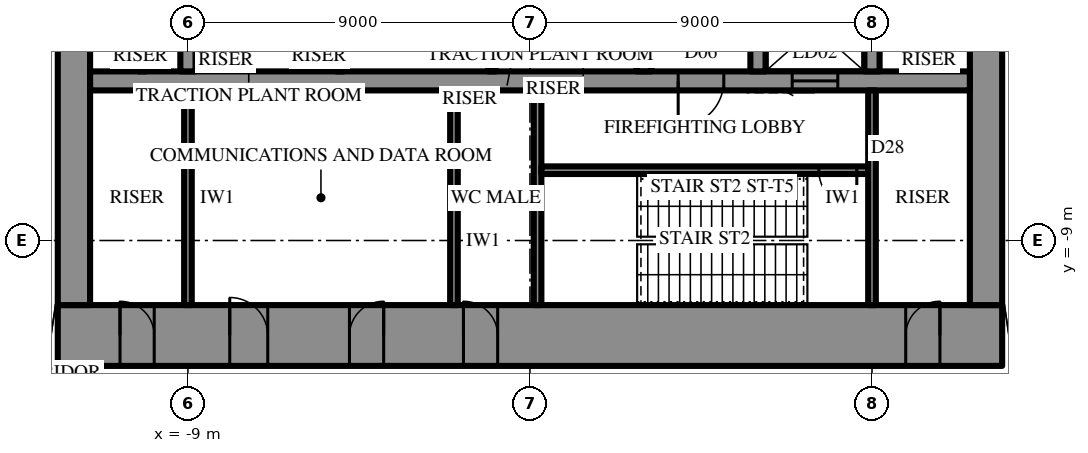
"""IFC4 building model, lengths in metres.
Left out: names, types, materials, properties, quantities, classifications, styles, units other than length and angle.
Written with IfcOpenShell. Run it as: python <this file> out.ifc"""

import sys

from ifc_helpers import new_model, si_unit, direction, frame, frame_2d, origin, place, context, subcontext, project, spatial, rectangle, extrude, element, fill, save


model = new_model("IFC4")
c1 = context("Model", 3, precision=1e-05, world=origin(), true_north=direction((0.0, 1.0)))
c2 = subcontext(c1, "Body", "Model", "MODEL_VIEW")
j1 = project(units=[si_unit("LENGTHUNIT", "METRE"), si_unit("PLANEANGLEUNIT", "RADIAN")], contexts=[c1])
p1 = place(None, origin())
s1 = spatial("IfcSite", under=j1, at=p1, CompositionType="ELEMENT")
p2 = place(p1, origin())
s2 = spatial("IfcBuilding", under=s1, at=p2, CompositionType="ELEMENT")
p3 = place(p2, frame((0.0, 0.0, 396.3)))
s3 = spatial("IfcBuildingStorey", under=s2, at=p3, CompositionType="ELEMENT", Elevation=396.3)
p4 = place(p3, frame((12.425, -11.5, 0.0), z_axis=(0.0, 0.0, 1.0), x_axis=(-1.0, 0.0, 0.0)))
e1 = element("IfcWall", 1, at=p4, inside=s3, PredefinedType="SHEAR", context=c2, shape_type="SweptSolid", body=[
    extrude(rectangle(XDim=24.85, YDim=1.6, at=frame_2d((12.425, 0.0))), origin(), (0.0, 0.0, 1.0), 6.0),
])
p5 = place(p4, frame((13.275, 0.0, 0.0)))
e2 = element("IfcOpeningElement", 2, at=p5, cuts=e1, PredefinedType="OPENING", context=c2, shape_type="SweptSolid", body=[
    extrude(rectangle(XDim=0.9, YDim=2.2, at=frame_2d((0.45, 1.1))), frame((0.0, 0.81, 0.0), z_axis=(0.0, -1.0, 0.0), x_axis=(1.0, 0.0, 0.0)), (0.0, 0.0, 1.0), 1.62),
])
p6 = place(p4, frame((16.275, 0.0, 0.0)))
e3 = element("IfcOpeningElement", 3, at=p6, cuts=e1, PredefinedType="OPENING", context=c2, shape_type="SweptSolid", body=[
    extrude(rectangle(XDim=0.9, YDim=2.2, at=frame_2d((0.45, 1.1))), frame((0.0, 0.81, 0.0), z_axis=(0.0, -1.0, 0.0), x_axis=(1.0, 0.0, 0.0)), (0.0, 0.0, 1.0), 1.62),
])
p7 = place(p4, frame((19.325, 0.0, 0.0)))
e4 = element("IfcOpeningElement", 4, at=p7, cuts=e1, PredefinedType="OPENING", context=c2, shape_type="SweptSolid", body=[
    extrude(rectangle(XDim=1.0, YDim=2.2, at=frame_2d((0.5, 1.1))), frame((0.0, 0.81, 0.0), z_axis=(0.0, -1.0, 0.0), x_axis=(1.0, 0.0, 0.0)), (0.0, 0.0, 1.0), 1.62),
])
p8 = place(p4, frame((1.637, 0.0, 0.0)))
e5 = element("IfcOpeningElement", 5, at=p8, cuts=e1, PredefinedType="OPENING", context=c2, shape_type="SweptSolid", body=[
    extrude(rectangle(XDim=0.9, YDim=2.2, at=frame_2d((0.45, 1.1))), frame((0.0, 0.81, 0.0), z_axis=(0.0, -1.0, 0.0), x_axis=(1.0, 0.0, 0.0)), (0.0, 0.0, 1.0), 1.62),
])
p9 = place(p4, frame((22.312, 0.0, 0.0)))
e6 = element("IfcOpeningElement", 6, at=p9, cuts=e1, PredefinedType="OPENING", context=c2, shape_type="SweptSolid", body=[
    extrude(rectangle(XDim=0.9, YDim=2.2, at=frame_2d((0.45, 1.1))), frame((0.0, 0.81, 0.0), z_axis=(0.0, -1.0, 0.0), x_axis=(1.0, 0.0, 0.0)), (0.0, 0.0, 1.0), 1.62),
])
p10 = place(p3, frame((12.0, -10.7, 0.0), z_axis=(0.0, 0.0, 1.0), x_axis=(0.0, 1.0, 0.0)))
e7 = element("IfcWall", 7, at=p10, inside=s3, PredefinedType="SHEAR", context=c2, shape_type="SweptSolid", body=[
    extrude(rectangle(XDim=21.4, YDim=0.85, at=frame_2d((10.7, 0.0))), origin(), (0.0, 0.0, 1.0), 6.0),
])
p11 = place(p10, frame((9.8, 0.0, 0.0)))
e8 = element("IfcOpeningElement", 8, at=p11, cuts=e7, PredefinedType="OPENING", context=c2, shape_type="SweptSolid", body=[
    extrude(rectangle(XDim=1.8, YDim=2.4, at=frame_2d((0.9, 1.2))), frame((0.0, 0.435, 0.0), z_axis=(0.0, -1.0, 0.0), x_axis=(1.0, 0.0, 0.0)), (0.0, 0.0, 1.0), 0.87),
])
p12 = place(p3, frame((-12.0, 10.7, 0.0), z_axis=(0.0, 0.0, 1.0), x_axis=(0.0, -1.0, 0.0)))
e9 = element("IfcWall", 9, at=p12, inside=s3, PredefinedType="SHEAR", context=c2, shape_type="SweptSolid", body=[
    extrude(rectangle(XDim=21.4, YDim=0.85, at=frame_2d((10.7, 0.0))), origin(), (0.0, 0.0, 1.0), 6.0),
])
p13 = place(p12, frame((9.8, 0.0, 0.0)))
e10 = element("IfcOpeningElement", 10, at=p13, cuts=e9, PredefinedType="OPENING", context=c2, shape_type="SweptSolid", body=[
    extrude(rectangle(XDim=1.8, YDim=2.4, at=frame_2d((0.9, 1.2))), frame((0.0, 0.435, 0.0), z_axis=(0.0, -1.0, 0.0), x_axis=(1.0, 0.0, 0.0)), (0.0, 0.0, 1.0), 0.87),
])
p14 = place(p3, frame((11.575, -4.8, 0.0), z_axis=(0.0, 0.0, 1.0), x_axis=(-1.0, 0.0, 0.0)))
e11 = element("IfcWall", 11, at=p14, inside=s3, PredefinedType="SHEAR", context=c2, shape_type="SweptSolid", body=[
    extrude(rectangle(XDim=23.15, YDim=0.5, at=frame_2d((11.575, 0.0))), origin(), (0.0, 0.0, 1.0), 6.0),
])
p15 = place(p14, frame((6.475, 0.0, 0.0)))
e12 = element("IfcOpeningElement", 12, at=p15, cuts=e11, PredefinedType="OPENING", context=c2, shape_type="SweptSolid", body=[
    extrude(rectangle(XDim=1.2, YDim=2.2, at=frame_2d((0.6, 1.1))), frame((0.0, 0.26, 0.0), z_axis=(0.0, -1.0, 0.0), x_axis=(1.0, 0.0, 0.0)), (0.0, 0.0, 1.0), 0.52),
])
p16 = place(p14, frame((3.475, 0.0, 0.0)))
e13 = element("IfcOpeningElement", 13, at=p16, cuts=e11, PredefinedType="OPENING", context=c2, shape_type="SweptSolid", body=[
    extrude(rectangle(XDim=1.2, YDim=2.2, at=frame_2d((0.6, 1.1))), frame((0.0, 0.26, 0.0), z_axis=(0.0, -1.0, 0.0), x_axis=(1.0, 0.0, 0.0)), (0.0, 0.0, 1.0), 0.52),
])
for number, where, z_axis, x_axis in (
    (14, (9.0, -2.25, 0.0), (0.0, 0.0, 1.0), (0.0, -1.0, 0.0)),
    (15, (6.0, -2.25, 0.0), (0.0, 0.0, 1.0), (0.0, -1.0, 0.0)),
    (16, (3.0, -2.25, 0.0), (0.0, 0.0, 1.0), (0.0, -1.0, 0.0)),
    (17, (-9.0, -2.25, 0.0), (0.0, 0.0, 1.0), (0.0, -1.0, 0.0)),
):
    element("IfcWall", number, at=place(p3, frame(where, z_axis=z_axis, x_axis=x_axis)), inside=s3, PredefinedType="SHEAR", context=c2, shape_type="SweptSolid", body=[
        extrude(rectangle(XDim=2.3, YDim=0.4, at=frame_2d((1.15, 0.0))), origin(), (0.0, 0.0, 1.0), 6.0),
    ])
p17 = place(p3, frame((0.2, -5.05, 0.0), z_axis=(0.0, 0.0, 1.0), x_axis=(0.0, -1.0, 0.0)))
e18 = element("IfcWall", 18, at=p17, inside=s3, PredefinedType="SHEAR", context=c2, shape_type="SweptSolid", body=[
    extrude(rectangle(XDim=5.65, YDim=0.2, at=frame_2d((2.825, 0.0))), origin(), (0.0, 0.0, 1.0), 6.0),
])
p18 = place(p3, frame((8.9, -7.15, 0.0), z_axis=(0.0, 0.0, 1.0), x_axis=(-1.0, 0.0, 0.0)))
e19 = element("IfcWall", 19, at=p18, inside=s3, PredefinedType="SHEAR", context=c2, shape_type="SweptSolid", body=[
    extrude(rectangle(XDim=8.6, YDim=0.2, at=frame_2d((4.3, 0.0))), origin(), (0.0, 0.0, 1.0), 6.0),
])
p19 = place(p18, frame((0.3, 0.0, 0.0)))
e20 = element("IfcOpeningElement", 20, at=p19, cuts=e19, PredefinedType="OPENING", context=c2, shape_type="SweptSolid", body=[
    extrude(rectangle(XDim=1.0, YDim=2.2, at=frame_2d((0.5, 1.1))), frame((0.0, 0.11, 0.0), z_axis=(0.0, -1.0, 0.0), x_axis=(1.0, 0.0, 0.0)), (0.0, 0.0, 1.0), 0.22),
])
for number, where, z_axis, x_axis in (
    (21, (9.0, -5.05, 0.0), (0.0, 0.0, 1.0), (0.0, -1.0, 0.0)),
    (22, (-9.0, -5.05, 0.0), (0.0, 0.0, 1.0), (0.0, -1.0, 0.0)),
    (23, (-2.0, -5.05, 0.0), (0.0, 0.0, 1.0), (0.0, -1.0, 0.0)),
):
    element("IfcWall", number, at=place(p3, frame(where, z_axis=z_axis, x_axis=x_axis)), inside=s3, PredefinedType="PARTITIONING", context=c2, shape_type="SweptSolid", body=[
        extrude(rectangle(XDim=5.65, YDim=0.2, at=frame_2d((2.825, 0.0))), origin(), (0.0, 0.0, 1.0), 5.8),
    ])
for number, where, z_axis, x_axis in (
    (24, (-1.0, -3.55, 0.0), (0.0, 0.0, 1.0), (0.0, -1.0, 0.0)),
    (25, (-5.0, -3.55, 0.0), (0.0, 0.0, 1.0), (0.0, -1.0, 0.0)),
    (26, (-10.2, -3.55, 0.0), (0.0, 0.0, 1.0), (0.0, -1.0, 0.0)),
):
    element("IfcWall", number, at=place(p3, frame(where, z_axis=z_axis, x_axis=x_axis)), inside=s3, PredefinedType="PARTITIONING", context=c2, shape_type="SweptSolid", body=[
        extrude(rectangle(XDim=1.0, YDim=0.2, at=frame_2d((0.5, 0.0))), origin(), (0.0, 0.0, 1.0), 5.8),
    ])
p20 = place(p15, origin())
e27 = element("IfcDoor", 27, at=p20, inside=s3, OperationType="SINGLE_SWING_LEFT", PredefinedType="DOOR", context=c2, shape_type="SweptSolid", body=[
    extrude(rectangle(XDim=1.2, YDim=2.2, at=frame_2d((0.6, 1.1))), frame((0.0, 0.025, 0.0), z_axis=(0.0, -1.0, 0.0), x_axis=(1.0, 0.0, 0.0)), (0.0, 0.0, 1.0), 0.05),
])
fill(e12, e27)
p21 = place(p19, origin())
e28 = element("IfcDoor", 28, at=p21, inside=s3, OperationType="SINGLE_SWING_RIGHT", PredefinedType="DOOR", context=c2, shape_type="SweptSolid", body=[
    extrude(rectangle(XDim=1.0, YDim=2.2, at=frame_2d((0.5, 1.1))), frame((0.0, 0.025, 0.0), z_axis=(0.0, -1.0, 0.0), x_axis=(1.0, 0.0, 0.0)), (0.0, 0.0, 1.0), 0.05),
])
fill(e20, e28)
p22 = place(p5, frame((0.9, 0.0, 0.0), z_axis=(0.0, 0.0, 1.0), x_axis=(-1.0, 0.0, 0.0)))
e29 = element("IfcDoor", 29, at=p22, inside=s3, OperationType="SINGLE_SWING_RIGHT", PredefinedType="DOOR", context=c2, shape_type="SweptSolid", body=[
    extrude(rectangle(XDim=0.9, YDim=2.2, at=frame_2d((0.45, 1.1))), frame((0.0, 0.025, 0.0), z_axis=(0.0, -1.0, 0.0), x_axis=(1.0, 0.0, 0.0)), (0.0, 0.0, 1.0), 0.05),
])
fill(e2, e29)
p23 = place(p6, frame((0.9, 0.0, 0.0), z_axis=(0.0, 0.0, 1.0), x_axis=(-1.0, 0.0, 0.0)))
e30 = element("IfcDoor", 30, at=p23, inside=s3, OperationType="SINGLE_SWING_LEFT", PredefinedType="DOOR", context=c2, shape_type="SweptSolid", body=[
    extrude(rectangle(XDim=0.9, YDim=2.2, at=frame_2d((0.45, 1.1))), frame((0.0, 0.025, 0.0), z_axis=(0.0, -1.0, 0.0), x_axis=(1.0, 0.0, 0.0)), (0.0, 0.0, 1.0), 0.05),
])
fill(e3, e30)
p24 = place(p7, frame((1.0, 0.0, 0.0), z_axis=(0.0, 0.0, 1.0), x_axis=(-1.0, 0.0, 0.0)))
e31 = element("IfcDoor", 31, at=p24, inside=s3, OperationType="SINGLE_SWING_RIGHT", PredefinedType="DOOR", context=c2, shape_type="SweptSolid", body=[
    extrude(rectangle(XDim=1.0, YDim=2.2, at=frame_2d((0.5, 1.1))), frame((0.0, 0.025, 0.0), z_axis=(0.0, -1.0, 0.0), x_axis=(1.0, 0.0, 0.0)), (0.0, 0.0, 1.0), 0.05),
])
fill(e4, e31)
p25 = place(p8, frame((0.9, 0.0, 0.0), z_axis=(0.0, 0.0, 1.0), x_axis=(-1.0, 0.0, 0.0)))
e32 = element("IfcDoor", 32, at=p25, inside=s3, OperationType="SINGLE_SWING_LEFT", PredefinedType="DOOR", context=c2, shape_type="SweptSolid", body=[
    extrude(rectangle(XDim=0.9, YDim=2.2, at=frame_2d((0.45, 1.1))), frame((0.0, 0.025, 0.0), z_axis=(0.0, -1.0, 0.0), x_axis=(1.0, 0.0, 0.0)), (0.0, 0.0, 1.0), 0.05),
])
fill(e5, e32)
p26 = place(p9, frame((0.9, 0.0, 0.0), z_axis=(0.0, 0.0, 1.0), x_axis=(-1.0, 0.0, 0.0)))
e33 = element("IfcDoor", 33, at=p26, inside=s3, OperationType="SINGLE_SWING_RIGHT", PredefinedType="DOOR", context=c2, shape_type="SweptSolid", body=[
    extrude(rectangle(XDim=0.9, YDim=2.2, at=frame_2d((0.45, 1.1))), frame((0.0, 0.025, 0.0), z_axis=(0.0, -1.0, 0.0), x_axis=(1.0, 0.0, 0.0)), (0.0, 0.0, 1.0), 0.05),
])
fill(e6, e33)
p27 = place(p16, origin())
e34 = element("IfcDoor", 34, at=p27, inside=s3, OperationType="SLIDING_TO_LEFT", PredefinedType="DOOR", context=c2, shape_type="SweptSolid", body=[
    extrude(rectangle(XDim=1.2, YDim=2.2, at=frame_2d((0.6, 1.1))), frame((0.0, 0.025, 0.0), z_axis=(0.0, -1.0, 0.0), x_axis=(1.0, 0.0, 0.0)), (0.0, 0.0, 1.0), 0.05),
])
fill(e13, e34)
save(model, sys.argv[1])
